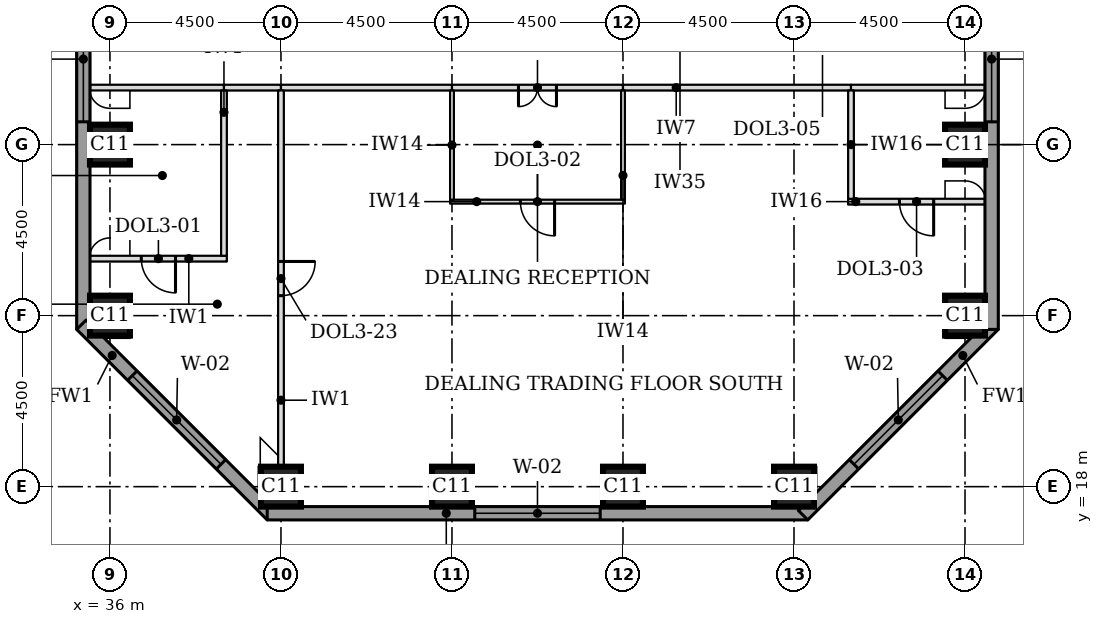
"""IFC4 building model, lengths in metres.
Left out: names, types, materials, properties, quantities, classifications, styles, units other than length and angle.
Written with IfcOpenShell. Run it as: python <this file> out.ifc"""

import sys

from ifc_helpers import new_model, si_unit, direction, frame, frame_2d, origin, origin_2d, place, context, subcontext, project, spatial, rectangle, extrude, element, fill, save


model = new_model("IFC4")
c1 = context("Model", 3, precision=1e-05, world=origin(), true_north=direction((0.0, 1.0)))
c2 = subcontext(c1, "Body", "Model", "MODEL_VIEW")
j1 = project(units=[si_unit("LENGTHUNIT", "METRE"), si_unit("PLANEANGLEUNIT", "RADIAN")], contexts=[c1])
p1 = place(None, origin())
s1 = spatial("IfcSite", under=j1, at=p1, CompositionType="ELEMENT")
p2 = place(p1, origin())
s2 = spatial("IfcBuilding", under=s1, at=p2, CompositionType="ELEMENT")
p3 = place(p2, frame((0.0, 0.0, 93.7)))
s3 = spatial("IfcBuildingStorey", under=s2, at=p3, CompositionType="ELEMENT", Elevation=93.7)
for number, where, z_axis, x_axis in (
    (1, (40.5, 18.0, 0.0), (0.0, 0.0, 1.0), (1.0, 0.0, 0.0)),
    (2, (45.0, 18.0, 0.0), (0.0, 0.0, 1.0), (1.0, 0.0, 0.0)),
    (3, (49.5, 18.0, 0.0), (0.0, 0.0, 1.0), (1.0, 0.0, 0.0)),
    (4, (54.0, 18.0, 0.0), (0.0, 0.0, 1.0), (1.0, 0.0, 0.0)),
    (5, (36.0, 22.5, 0.0), (0.0, 0.0, 1.0), (1.0, 0.0, 0.0)),
    (6, (58.5, 22.5, 0.0), (0.0, 0.0, 1.0), (1.0, 0.0, 0.0)),
    (7, (36.0, 27.0, 0.0), (0.0, 0.0, 1.0), (1.0, 0.0, 0.0)),
    (8, (58.5, 27.0, 0.0), (0.0, 0.0, 1.0), (1.0, 0.0, 0.0)),
):
    element("IfcColumn", number, at=place(p3, frame(where, z_axis=z_axis, x_axis=x_axis)), inside=s3, PredefinedType="COLUMN", context=c2, shape_type="SweptSolid", body=[
        extrude(rectangle(XDim=1.05, YDim=1.05, at=origin_2d()), origin(), (0.0, 0.0, 1.0), 3.7),
    ])
p4 = place(p3, frame((35.3, 39.975, 0.0), z_axis=(0.0, 0.0, 1.0), x_axis=(0.0, -1.0, 0.0)))
e9 = element("IfcWall", 9, at=p4, inside=s3, PredefinedType="STANDARD", context=c2, shape_type="SweptSolid", body=[
    extrude(rectangle(XDim=17.837, YDim=0.35, at=frame_2d((8.919, 0.0))), origin(), (0.0, 0.0, 1.0), 3.525),
])
p5 = place(p4, frame((0.5, 0.0, 0.9)))
e10 = element("IfcOpeningElement", 10, at=p5, cuts=e9, PredefinedType="OPENING", context=c2, shape_type="SweptSolid", body=[
    extrude(rectangle(XDim=3.3, YDim=1.9, at=frame_2d((1.65, 0.95))), frame((0.0, 0.185, 0.0), z_axis=(0.0, -1.0, 0.0), x_axis=(1.0, 0.0, 0.0)), (0.0, 0.0, 1.0), 0.37),
])
p6 = place(p4, frame((9.075, 0.0, 0.9)))
e11 = element("IfcOpeningElement", 11, at=p6, cuts=e9, PredefinedType="OPENING", context=c2, shape_type="SweptSolid", body=[
    extrude(rectangle(XDim=3.3, YDim=1.9, at=frame_2d((1.65, 0.95))), frame((0.0, 0.185, 0.0), z_axis=(0.0, -1.0, 0.0), x_axis=(1.0, 0.0, 0.0)), (0.0, 0.0, 1.0), 0.37),
])
p7 = place(p3, frame((35.249, 22.261, 0.0), z_axis=(0.0, 0.0, 1.0), x_axis=(0.707106781187, -0.707106781187, 0.0)))
e12 = element("IfcWall", 12, at=p7, inside=s3, PredefinedType="STANDARD", context=c2, shape_type="SweptSolid", body=[
    extrude(rectangle(XDim=7.089, YDim=0.35, at=frame_2d((3.544, 0.0))), origin(), (0.0, 0.0, 1.0), 3.525),
])
p8 = place(p7, frame((1.894, 0.0, 0.9)))
e13 = element("IfcOpeningElement", 13, at=p8, cuts=e12, PredefinedType="OPENING", context=c2, shape_type="SweptSolid", body=[
    extrude(rectangle(XDim=3.3, YDim=1.9, at=frame_2d((1.65, 0.95))), frame((0.0, 0.185, 0.0), z_axis=(0.0, -1.0, 0.0), x_axis=(1.0, 0.0, 0.0)), (0.0, 0.0, 1.0), 0.37),
])
p9 = place(p3, frame((40.138, 17.3, 0.0), z_axis=(0.0, 0.0, 1.0), x_axis=(1.0, 0.0, 0.0)))
e14 = element("IfcWall", 14, at=p9, inside=s3, PredefinedType="STANDARD", context=c2, shape_type="SweptSolid", body=[
    extrude(rectangle(XDim=14.225, YDim=0.35, at=frame_2d((7.112, 0.0))), origin(), (0.0, 0.0, 1.0), 3.525),
])
p10 = place(p9, frame((5.462, 0.0, 0.9)))
e15 = element("IfcOpeningElement", 15, at=p10, cuts=e14, PredefinedType="OPENING", context=c2, shape_type="SweptSolid", body=[
    extrude(rectangle(XDim=3.3, YDim=1.9, at=frame_2d((1.65, 0.95))), frame((0.0, 0.185, 0.0), z_axis=(0.0, -1.0, 0.0), x_axis=(1.0, 0.0, 0.0)), (0.0, 0.0, 1.0), 0.37),
])
p11 = place(p3, frame((54.239, 17.249, 0.0), z_axis=(0.0, 0.0, 1.0), x_axis=(0.707106781187, 0.707106781187, 0.0)))
e16 = element("IfcWall", 16, at=p11, inside=s3, PredefinedType="STANDARD", context=c2, shape_type="SweptSolid", body=[
    extrude(rectangle(XDim=7.089, YDim=0.35, at=frame_2d((3.544, 0.0))), origin(), (0.0, 0.0, 1.0), 3.525),
])
p12 = place(p11, frame((1.894, 0.0, 0.9)))
e17 = element("IfcOpeningElement", 17, at=p12, cuts=e16, PredefinedType="OPENING", context=c2, shape_type="SweptSolid", body=[
    extrude(rectangle(XDim=3.3, YDim=1.9, at=frame_2d((1.65, 0.95))), frame((0.0, 0.185, 0.0), z_axis=(0.0, -1.0, 0.0), x_axis=(1.0, 0.0, 0.0)), (0.0, 0.0, 1.0), 0.37),
])
p13 = place(p3, frame((59.2, 22.138, 0.0), z_axis=(0.0, 0.0, 1.0), x_axis=(0.0, 1.0, 0.0)))
e18 = element("IfcWall", 18, at=p13, inside=s3, PredefinedType="STANDARD", context=c2, shape_type="SweptSolid", body=[
    extrude(rectangle(XDim=17.837, YDim=0.35, at=frame_2d((8.919, 0.0))), origin(), (0.0, 0.0, 1.0), 3.525),
])
p14 = place(p13, frame((5.462, 0.0, 0.9)))
e19 = element("IfcOpeningElement", 19, at=p14, cuts=e18, PredefinedType="OPENING", context=c2, shape_type="SweptSolid", body=[
    extrude(rectangle(XDim=3.3, YDim=1.9, at=frame_2d((1.65, 0.95))), frame((0.0, 0.185, 0.0), z_axis=(0.0, -1.0, 0.0), x_axis=(1.0, 0.0, 0.0)), (0.0, 0.0, 1.0), 0.37),
])
p15 = place(p13, frame((14.037, 0.0, 0.9)))
e20 = element("IfcOpeningElement", 20, at=p15, cuts=e18, PredefinedType="OPENING", context=c2, shape_type="SweptSolid", body=[
    extrude(rectangle(XDim=3.3, YDim=1.9, at=frame_2d((1.65, 0.95))), frame((0.0, 0.185, 0.0), z_axis=(0.0, -1.0, 0.0), x_axis=(1.0, 0.0, 0.0)), (0.0, 0.0, 1.0), 0.37),
])
p16 = place(p3, frame((35.475, 24.0, 0.0), z_axis=(0.0, 0.0, 1.0), x_axis=(1.0, 0.0, 0.0)))
e21 = element("IfcWall", 21, at=p16, inside=s3, PredefinedType="PARTITIONING", context=c2, shape_type="SweptSolid", body=[
    extrude(rectangle(XDim=3.6, YDim=0.15, at=frame_2d((1.8, 0.0))), origin(), (0.0, 0.0, 1.0), 3.55),
])
p17 = place(p16, frame((1.35, 0.0, 0.0)))
e22 = element("IfcOpeningElement", 22, at=p17, cuts=e21, PredefinedType="OPENING", context=c2, shape_type="SweptSolid", body=[
    extrude(rectangle(XDim=0.9, YDim=2.1, at=frame_2d((0.45, 1.05))), frame((0.0, 0.085, 0.0), z_axis=(0.0, -1.0, 0.0), x_axis=(1.0, 0.0, 0.0)), (0.0, 0.0, 1.0), 0.17),
])
p18 = place(p3, frame((44.95, 25.5, 0.0), z_axis=(0.0, 0.0, 1.0), x_axis=(1.0, 0.0, 0.0)))
e23 = element("IfcWall", 23, at=p18, inside=s3, PredefinedType="PARTITIONING", context=c2, shape_type="SweptSolid", body=[
    extrude(rectangle(XDim=4.6, YDim=0.1, at=frame_2d((2.3, 0.0))), origin(), (0.0, 0.0, 1.0), 3.55),
])
p19 = place(p18, frame((1.85, 0.0, 0.0)))
e24 = element("IfcOpeningElement", 24, at=p19, cuts=e23, PredefinedType="OPENING", context=c2, shape_type="SweptSolid", body=[
    extrude(rectangle(XDim=0.9, YDim=2.1, at=frame_2d((0.45, 1.05))), frame((0.0, 0.06, 0.0), z_axis=(0.0, -1.0, 0.0), x_axis=(1.0, 0.0, 0.0)), (0.0, 0.0, 1.0), 0.12),
])
p20 = place(p3, frame((55.425, 25.5, 0.0), z_axis=(0.0, 0.0, 1.0), x_axis=(1.0, 0.0, 0.0)))
e25 = element("IfcWall", 25, at=p20, inside=s3, PredefinedType="PARTITIONING", context=c2, shape_type="SweptSolid", body=[
    extrude(rectangle(XDim=3.6, YDim=0.15, at=frame_2d((1.8, 0.0))), origin(), (0.0, 0.0, 1.0), 3.55),
])
p21 = place(p20, frame((1.35, 0.0, 0.0)))
e26 = element("IfcOpeningElement", 26, at=p21, cuts=e25, PredefinedType="OPENING", context=c2, shape_type="SweptSolid", body=[
    extrude(rectangle(XDim=0.9, YDim=2.1, at=frame_2d((0.45, 1.05))), frame((0.0, 0.085, 0.0), z_axis=(0.0, -1.0, 0.0), x_axis=(1.0, 0.0, 0.0)), (0.0, 0.0, 1.0), 0.17),
])
p22 = place(p3, frame((35.475, 28.5, 0.0), z_axis=(0.0, 0.0, 1.0), x_axis=(1.0, 0.0, 0.0)))
e27 = element("IfcWall", 27, at=p22, inside=s3, PredefinedType="PARTITIONING", context=c2, shape_type="SweptSolid", body=[
    extrude(rectangle(XDim=3.525, YDim=0.15, at=frame_2d((1.762, 0.0))), origin(), (0.0, 0.0, 1.0), 3.55),
])
p23 = place(p3, frame((39.0, 28.5, 0.0), z_axis=(0.0, 0.0, 1.0), x_axis=(1.0, 0.0, 0.0)))
e28 = element("IfcWall", 28, at=p23, inside=s3, PredefinedType="PARTITIONING", context=c2, shape_type="SweptSolid", body=[
    extrude(rectangle(XDim=1.5, YDim=0.15, at=frame_2d((0.75, 0.0))), origin(), (0.0, 0.0, 1.0), 3.55),
])
p24 = place(p3, frame((40.5, 28.5, 0.0), z_axis=(0.0, 0.0, 1.0), x_axis=(1.0, 0.0, 0.0)))
e29 = element("IfcWall", 29, at=p24, inside=s3, PredefinedType="PARTITIONING", context=c2, shape_type="SweptSolid", body=[
    extrude(rectangle(XDim=4.5, YDim=0.15, at=frame_2d((2.25, 0.0))), origin(), (0.0, 0.0, 1.0), 3.55),
])
p25 = place(p3, frame((45.0, 28.5, 0.0), z_axis=(0.0, 0.0, 1.0), x_axis=(1.0, 0.0, 0.0)))
e30 = element("IfcWall", 30, at=p25, inside=s3, PredefinedType="PARTITIONING", context=c2, shape_type="SweptSolid", body=[
    extrude(rectangle(XDim=4.5, YDim=0.15, at=frame_2d((2.25, 0.0))), origin(), (0.0, 0.0, 1.0), 3.55),
])
p26 = place(p25, frame((1.75, 0.0, 0.0)))
e31 = element("IfcOpeningElement", 31, at=p26, cuts=e30, PredefinedType="OPENING", context=c2, shape_type="SweptSolid", body=[
    extrude(rectangle(XDim=1.0, YDim=2.1, at=frame_2d((0.5, 1.05))), frame((0.0, 0.085, 0.0), z_axis=(0.0, -1.0, 0.0), x_axis=(1.0, 0.0, 0.0)), (0.0, 0.0, 1.0), 0.17),
])
p27 = place(p3, frame((49.5, 28.5, 0.0), z_axis=(0.0, 0.0, 1.0), x_axis=(1.0, 0.0, 0.0)))
e32 = element("IfcWall", 32, at=p27, inside=s3, PredefinedType="PARTITIONING", context=c2, shape_type="SweptSolid", body=[
    extrude(rectangle(XDim=6.0, YDim=0.15, at=frame_2d((3.0, 0.0))), origin(), (0.0, 0.0, 1.0), 3.55),
])
p28 = place(p3, frame((55.5, 28.5, 0.0), z_axis=(0.0, 0.0, 1.0), x_axis=(1.0, 0.0, 0.0)))
e33 = element("IfcWall", 33, at=p28, inside=s3, PredefinedType="PARTITIONING", context=c2, shape_type="SweptSolid", body=[
    extrude(rectangle(XDim=3.525, YDim=0.15, at=frame_2d((1.762, 0.0))), origin(), (0.0, 0.0, 1.0), 3.55),
])
p29 = place(p3, frame((40.5, 18.525, 0.0), z_axis=(0.0, 0.0, 1.0), x_axis=(0.0, 1.0, 0.0)))
e34 = element("IfcWall", 34, at=p29, inside=s3, PredefinedType="PARTITIONING", context=c2, shape_type="SweptSolid", body=[
    extrude(rectangle(XDim=9.9, YDim=0.15, at=frame_2d((4.95, 0.0))), origin(), (0.0, 0.0, 1.0), 3.55),
])
p30 = place(p29, frame((4.5, 0.0, 0.0)))
e35 = element("IfcOpeningElement", 35, at=p30, cuts=e34, PredefinedType="OPENING", context=c2, shape_type="SweptSolid", body=[
    extrude(rectangle(XDim=0.9, YDim=2.1, at=frame_2d((0.45, 1.05))), frame((0.0, 0.085, 0.0), z_axis=(0.0, -1.0, 0.0), x_axis=(1.0, 0.0, 0.0)), (0.0, 0.0, 1.0), 0.17),
])
p31 = place(p3, frame((39.0, 24.075, 0.0), z_axis=(0.0, 0.0, 1.0), x_axis=(0.0, 1.0, 0.0)))
e36 = element("IfcWall", 36, at=p31, inside=s3, PredefinedType="PARTITIONING", context=c2, shape_type="SweptSolid", body=[
    extrude(rectangle(XDim=4.35, YDim=0.15, at=frame_2d((2.175, 0.0))), origin(), (0.0, 0.0, 1.0), 3.55),
])
for number, where, z_axis, x_axis in (
    (37, (45.0, 25.55, 0.0), (0.0, 0.0, 1.0), (0.0, 1.0, 0.0)),
    (38, (49.5, 25.55, 0.0), (0.0, 0.0, 1.0), (0.0, 1.0, 0.0)),
):
    element("IfcWall", number, at=place(p3, frame(where, z_axis=z_axis, x_axis=x_axis)), inside=s3, PredefinedType="PARTITIONING", context=c2, shape_type="SweptSolid", body=[
        extrude(rectangle(XDim=2.875, YDim=0.1, at=frame_2d((1.438, 0.0))), origin(), (0.0, 0.0, 1.0), 3.55),
    ])
p32 = place(p3, frame((55.5, 25.575, 0.0), z_axis=(0.0, 0.0, 1.0), x_axis=(0.0, 1.0, 0.0)))
e39 = element("IfcWall", 39, at=p32, inside=s3, PredefinedType="PARTITIONING", context=c2, shape_type="SweptSolid", body=[
    extrude(rectangle(XDim=2.85, YDim=0.15, at=frame_2d((1.425, 0.0))), origin(), (0.0, 0.0, 1.0), 3.55),
])
p33 = place(p6, origin())
e40 = element("IfcWindow", 40, at=p33, inside=s3, PartitioningType="SINGLE_PANEL", PredefinedType="WINDOW", context=c2, shape_type="SweptSolid", body=[
    extrude(rectangle(XDim=3.3, YDim=1.9, at=frame_2d((1.65, 0.95))), frame((0.0, 0.085, 0.0), z_axis=(0.0, -1.0, 0.0), x_axis=(1.0, 0.0, 0.0)), (0.0, 0.0, 1.0), 0.06),
])
fill(e11, e40)
p34 = place(p8, origin())
e41 = element("IfcWindow", 41, at=p34, inside=s3, PartitioningType="SINGLE_PANEL", PredefinedType="WINDOW", context=c2, shape_type="SweptSolid", body=[
    extrude(rectangle(XDim=3.3, YDim=1.9, at=frame_2d((1.65, 0.95))), frame((0.0, 0.085, 0.0), z_axis=(0.0, -1.0, 0.0), x_axis=(1.0, 0.0, 0.0)), (0.0, 0.0, 1.0), 0.06),
])
fill(e13, e41)
p35 = place(p10, origin())
e42 = element("IfcWindow", 42, at=p35, inside=s3, PartitioningType="SINGLE_PANEL", PredefinedType="WINDOW", context=c2, shape_type="SweptSolid", body=[
    extrude(rectangle(XDim=3.3, YDim=1.9, at=frame_2d((1.65, 0.95))), frame((0.0, 0.085, 0.0), z_axis=(0.0, -1.0, 0.0), x_axis=(1.0, 0.0, 0.0)), (0.0, 0.0, 1.0), 0.06),
])
fill(e15, e42)
p36 = place(p12, origin())
e43 = element("IfcWindow", 43, at=p36, inside=s3, PartitioningType="SINGLE_PANEL", PredefinedType="WINDOW", context=c2, shape_type="SweptSolid", body=[
    extrude(rectangle(XDim=3.3, YDim=1.9, at=frame_2d((1.65, 0.95))), frame((0.0, 0.085, 0.0), z_axis=(0.0, -1.0, 0.0), x_axis=(1.0, 0.0, 0.0)), (0.0, 0.0, 1.0), 0.06),
])
fill(e17, e43)
p37 = place(p14, origin())
e44 = element("IfcWindow", 44, at=p37, inside=s3, PartitioningType="SINGLE_PANEL", PredefinedType="WINDOW", context=c2, shape_type="SweptSolid", body=[
    extrude(rectangle(XDim=3.3, YDim=1.9, at=frame_2d((1.65, 0.95))), frame((0.0, 0.085, 0.0), z_axis=(0.0, -1.0, 0.0), x_axis=(1.0, 0.0, 0.0)), (0.0, 0.0, 1.0), 0.06),
])
fill(e19, e44)
p38 = place(p26, frame((1.0, 0.0, 0.0), z_axis=(0.0, 0.0, 1.0), x_axis=(-1.0, 0.0, 0.0)))
e45 = element("IfcDoor", 45, at=p38, inside=s3, OperationType="DOUBLE_DOOR_SINGLE_SWING", PredefinedType="DOOR", context=c2, shape_type="SweptSolid", body=[
    extrude(rectangle(XDim=1.0, YDim=2.1, at=frame_2d((0.5, 1.05))), frame((0.0, 0.025, 0.0), z_axis=(0.0, -1.0, 0.0), x_axis=(1.0, 0.0, 0.0)), (0.0, 0.0, 1.0), 0.05),
])
fill(e31, e45)
p39 = place(p19, frame((0.9, 0.0, 0.0), z_axis=(0.0, 0.0, 1.0), x_axis=(-1.0, 0.0, 0.0)))
e46 = element("IfcDoor", 46, at=p39, inside=s3, OperationType="SINGLE_SWING_LEFT", PredefinedType="DOOR", context=c2, shape_type="SweptSolid", body=[
    extrude(rectangle(XDim=0.9, YDim=2.1, at=frame_2d((0.45, 1.05))), frame((0.0, 0.025, 0.0), z_axis=(0.0, -1.0, 0.0), x_axis=(1.0, 0.0, 0.0)), (0.0, 0.0, 1.0), 0.05),
])
fill(e24, e46)
p40 = place(p21, frame((0.9, 0.0, 0.0), z_axis=(0.0, 0.0, 1.0), x_axis=(-1.0, 0.0, 0.0)))
e47 = element("IfcDoor", 47, at=p40, inside=s3, OperationType="SINGLE_SWING_LEFT", PredefinedType="DOOR", context=c2, shape_type="SweptSolid", body=[
    extrude(rectangle(XDim=0.9, YDim=2.1, at=frame_2d((0.45, 1.05))), frame((0.0, 0.025, 0.0), z_axis=(0.0, -1.0, 0.0), x_axis=(1.0, 0.0, 0.0)), (0.0, 0.0, 1.0), 0.05),
])
fill(e26, e47)
p41 = place(p30, frame((0.9, 0.0, 0.0), z_axis=(0.0, 0.0, 1.0), x_axis=(-1.0, 0.0, 0.0)))
e48 = element("IfcDoor", 48, at=p41, inside=s3, OperationType="SINGLE_SWING_LEFT", PredefinedType="DOOR", context=c2, shape_type="SweptSolid", body=[
    extrude(rectangle(XDim=0.9, YDim=2.1, at=frame_2d((0.45, 1.05))), frame((0.0, 0.025, 0.0), z_axis=(0.0, -1.0, 0.0), x_axis=(1.0, 0.0, 0.0)), (0.0, 0.0, 1.0), 0.05),
])
fill(e35, e48)
p42 = place(p17, frame((0.9, 0.0, 0.0), z_axis=(0.0, 0.0, 1.0), x_axis=(-1.0, 0.0, 0.0)))
e49 = element("IfcDoor", 49, at=p42, inside=s3, OperationType="SINGLE_SWING_LEFT", PredefinedType="DOOR", context=c2, shape_type="SweptSolid", body=[
    extrude(rectangle(XDim=0.9, YDim=2.1, at=frame_2d((0.45, 1.05))), frame((0.0, 0.025, 0.0), z_axis=(0.0, -1.0, 0.0), x_axis=(1.0, 0.0, 0.0)), (0.0, 0.0, 1.0), 0.05),
])
fill(e22, e49)
save(model, sys.argv[1])
